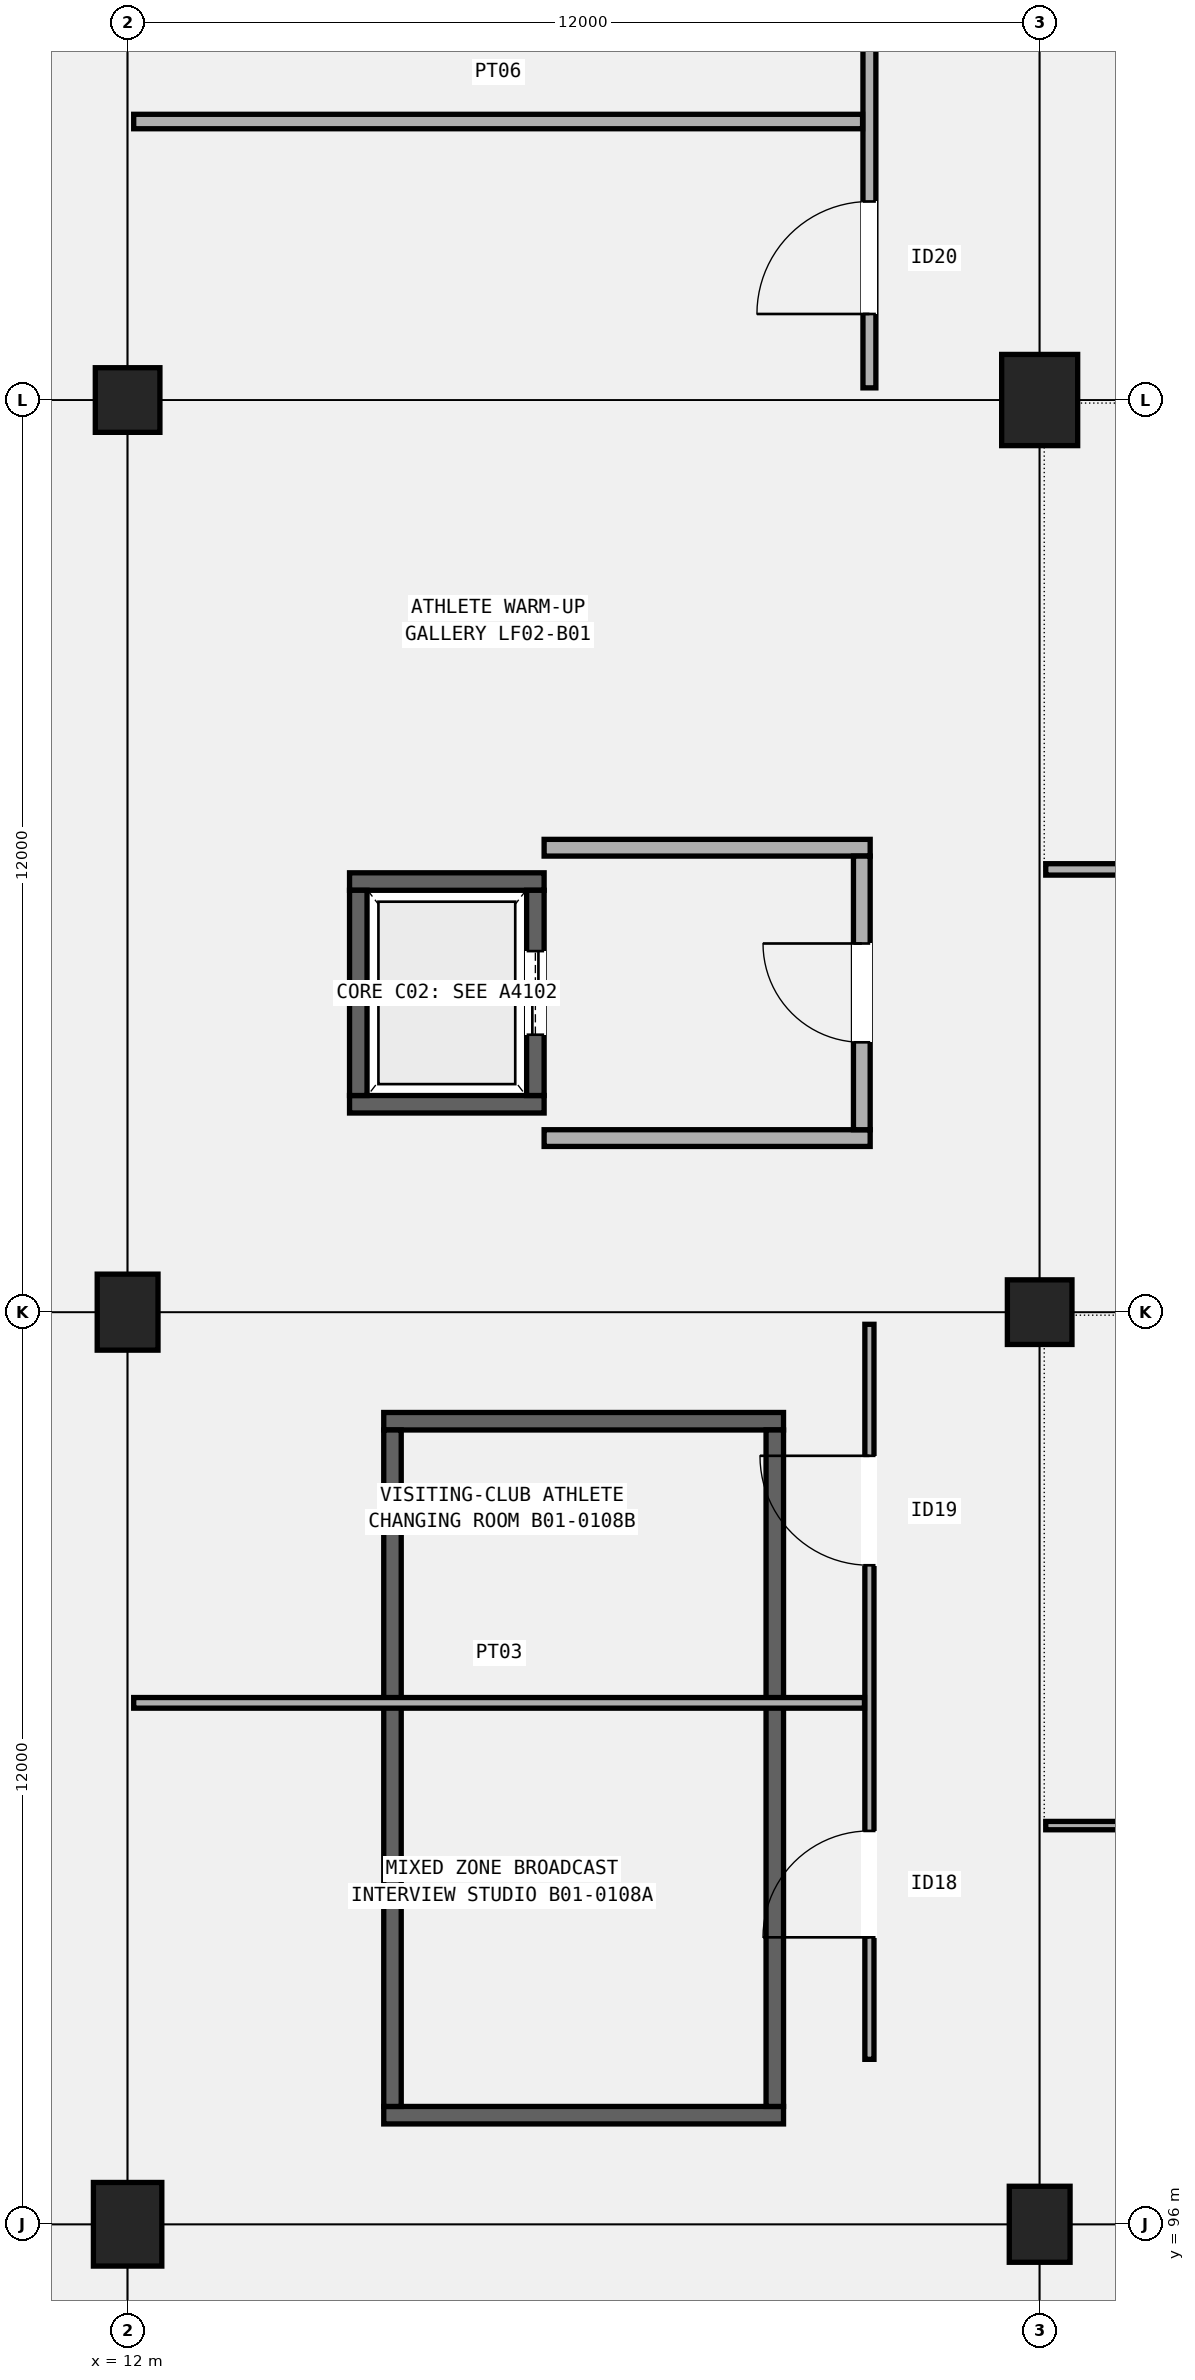
"""IFC4 building model, lengths in metres.
Left out: names, types, materials, properties, quantities, classifications, styles, units other than length and angle.
Written with IfcOpenShell. Run it as: python <this file> out.ifc"""

import sys

from ifc_helpers import new_model, si_unit, direction, frame, frame_2d, origin, origin_2d, place, context, subcontext, project, spatial, rectangle, circle, extrude, element, fill, save


model = new_model("IFC4")
c1 = context("Model", 3, precision=1e-05, world=origin(), true_north=direction((0.0, 1.0)))
c2 = subcontext(c1, "Body", "Model", "MODEL_VIEW")
j1 = project(units=[si_unit("LENGTHUNIT", "METRE"), si_unit("PLANEANGLEUNIT", "RADIAN")], contexts=[c1])
p1 = place(None, origin())
s1 = spatial("IfcSite", under=j1, at=p1, CompositionType="ELEMENT")
p2 = place(p1, origin())
s2 = spatial("IfcBuilding", under=s1, at=p2, CompositionType="ELEMENT")
p3 = place(p2, frame((0.0, 0.0, -4.8)))
s3 = spatial("IfcBuildingStorey", under=s2, at=p3, CompositionType="ELEMENT", Elevation=-4.8)
p4 = place(p3, frame((12.0, 96.0, 0.0), z_axis=(0.0, 0.0, 1.0), x_axis=(1.0, 0.0, 0.0)))
e1 = element("IfcColumn", 1, at=p4, inside=s3, PredefinedType="COLUMN", context=c2, shape_type="SweptSolid", body=[
    extrude(rectangle(XDim=0.9, YDim=1.1, at=origin_2d()), origin(), (0.0, 0.0, 1.0), 4.8),
])
p5 = place(p3, frame((12.0, 108.0, 0.0), z_axis=(0.0, 0.0, 1.0), x_axis=(1.0, 0.0, 0.0)))
e2 = element("IfcColumn", 2, at=p5, inside=s3, PredefinedType="COLUMN", context=c2, shape_type="SweptSolid", body=[
    extrude(rectangle(XDim=0.8, YDim=1.0, at=origin_2d()), origin(), (0.0, 0.0, 1.0), 4.8),
])
p6 = place(p3, frame((12.0, 120.0, 0.0), z_axis=(0.0, 0.0, 1.0), x_axis=(1.0, 0.0, 0.0)))
e3 = element("IfcColumn", 3, at=p6, inside=s3, PredefinedType="COLUMN", context=c2, shape_type="SweptSolid", body=[
    extrude(circle(Radius=0.425, at=origin_2d()), origin(), (0.0, 0.0, 1.0), 4.8),
])
p7 = place(p3, frame((24.0, 96.0, 0.0), z_axis=(0.0, 0.0, 1.0), x_axis=(1.0, 0.0, 0.0)))
e4 = element("IfcColumn", 4, at=p7, inside=s3, PredefinedType="COLUMN", context=c2, shape_type="SweptSolid", body=[
    extrude(rectangle(XDim=0.8, YDim=1.0, at=origin_2d()), origin(), (0.0, 0.0, 1.0), 4.8),
])
p8 = place(p3, frame((24.0, 108.0, 0.0), z_axis=(0.0, 0.0, 1.0), x_axis=(1.0, 0.0, 0.0)))
e5 = element("IfcColumn", 5, at=p8, inside=s3, PredefinedType="COLUMN", context=c2, shape_type="SweptSolid", body=[
    extrude(circle(Radius=0.425, at=origin_2d()), origin(), (0.0, 0.0, 1.0), 4.8),
])
p9 = place(p3, frame((24.0, 120.0, 0.0), z_axis=(0.0, 0.0, 1.0), x_axis=(1.0, 0.0, 0.0)))
e6 = element("IfcColumn", 6, at=p9, inside=s3, PredefinedType="COLUMN", context=c2, shape_type="SweptSolid", body=[
    extrude(rectangle(XDim=1.0, YDim=1.2, at=origin_2d()), origin(), (0.0, 0.0, 1.0), 4.8),
])
for number, where, z_axis, x_axis in (
    (7, (15.37, 97.435, 0.0), (0.0, 0.0, 1.0), (1.0, 0.0, 0.0)),
    (8, (15.37, 106.565, 0.0), (0.0, 0.0, 1.0), (1.0, 0.0, 0.0)),
):
    element("IfcWall", number, at=place(p3, frame(where, z_axis=z_axis, x_axis=x_axis)), inside=s3, PredefinedType="SHEAR", context=c2, shape_type="SweptSolid", body=[
        extrude(rectangle(XDim=5.26, YDim=0.23, at=frame_2d((2.63, 0.0))), origin(), (0.0, 0.0, 1.0), 4.5),
    ])
for number, where, z_axis, x_axis in (
    (9, (15.485, 97.55, 0.0), (0.0, 0.0, 1.0), (0.0, 1.0, 0.0)),
    (10, (20.515, 97.55, 0.0), (0.0, 0.0, 1.0), (0.0, 1.0, 0.0)),
):
    element("IfcWall", number, at=place(p3, frame(where, z_axis=z_axis, x_axis=x_axis)), inside=s3, PredefinedType="SHEAR", context=c2, shape_type="SweptSolid", body=[
        extrude(rectangle(XDim=8.9, YDim=0.23, at=frame_2d((4.45, 0.0))), origin(), (0.0, 0.0, 1.0), 4.5),
    ])
for number, where, z_axis, x_axis in (
    (11, (14.92, 110.735, -0.65), (0.0, 0.0, 1.0), (1.0, 0.0, 0.0)),
    (12, (14.92, 113.665, -0.65), (0.0, 0.0, 1.0), (1.0, 0.0, 0.0)),
):
    element("IfcWall", number, at=place(p3, frame(where, z_axis=z_axis, x_axis=x_axis)), inside=s3, PredefinedType="SHEAR", context=c2, shape_type="SweptSolid", body=[
        extrude(rectangle(XDim=2.56, YDim=0.23, at=frame_2d((1.28, 0.0))), origin(), (0.0, 0.0, 1.0), 4.5),
    ])
p10 = place(p3, frame((15.035, 110.85, -0.65), z_axis=(0.0, 0.0, 1.0), x_axis=(0.0, 1.0, 0.0)))
e13 = element("IfcWall", 13, at=p10, inside=s3, PredefinedType="SHEAR", context=c2, shape_type="SweptSolid", body=[
    extrude(rectangle(XDim=2.7, YDim=0.23, at=frame_2d((1.35, 0.0))), origin(), (0.0, 0.0, 1.0), 4.5),
])
p11 = place(p3, frame((17.365, 110.85, -0.65), z_axis=(0.0, 0.0, 1.0), x_axis=(0.0, 1.0, 0.0)))
e14 = element("IfcWall", 14, at=p11, inside=s3, PredefinedType="SHEAR", context=c2, shape_type="SweptSolid", body=[
    extrude(rectangle(XDim=2.7, YDim=0.23, at=frame_2d((1.35, 0.0))), origin(), (0.0, 0.0, 1.0), 4.5),
])
p12 = place(p11, frame((0.8, 0.0, 0.65)))
e15 = element("IfcOpeningElement", 15, at=p12, cuts=e14, PredefinedType="OPENING", context=c2, shape_type="SweptSolid", body=[
    extrude(rectangle(XDim=1.1, YDim=2.15, at=frame_2d((0.55, 1.075))), frame((0.0, 0.125, 0.0), z_axis=(0.0, -1.0, 0.0), x_axis=(1.0, 0.0, 0.0)), (0.0, 0.0, 1.0), 0.25),
])
for number, where, z_axis, x_axis in (
    (16, (17.48, 110.29, -0.65), (0.0, 0.0, 1.0), (1.0, 0.0, 0.0)),
    (17, (17.48, 114.11, -0.65), (0.0, 0.0, 1.0), (1.0, 0.0, 0.0)),
):
    element("IfcWall", number, at=place(p3, frame(where, z_axis=z_axis, x_axis=x_axis)), inside=s3, PredefinedType="SOLIDWALL", context=c2, shape_type="SweptSolid", body=[
        extrude(rectangle(XDim=4.29, YDim=0.22, at=frame_2d((2.145, 0.0))), origin(), (0.0, 0.0, 1.0), 4.57),
    ])
p13 = place(p3, frame((21.66, 110.4, -0.65), z_axis=(0.0, 0.0, 1.0), x_axis=(0.0, 1.0, 0.0)))
e18 = element("IfcWall", 18, at=p13, inside=s3, PredefinedType="SOLIDWALL", context=c2, shape_type="SweptSolid", body=[
    extrude(rectangle(XDim=3.6, YDim=0.22, at=frame_2d((1.8, 0.0))), origin(), (0.0, 0.0, 1.0), 4.57),
])
p14 = place(p13, frame((1.15, 0.0, 0.65)))
e19 = element("IfcOpeningElement", 19, at=p14, cuts=e18, PredefinedType="OPENING", context=c2, shape_type="SweptSolid", body=[
    extrude(rectangle(XDim=1.3, YDim=2.15, at=frame_2d((0.65, 1.075))), frame((0.0, 0.12, 0.0), z_axis=(0.0, -1.0, 0.0), x_axis=(1.0, 0.0, 0.0)), (0.0, 0.0, 1.0), 0.24),
])
p15 = place(p3, frame((21.76, 98.17, 0.0), z_axis=(0.0, 0.0, 1.0), x_axis=(0.0, 1.0, 0.0)))
e20 = element("IfcWall", 20, at=p15, inside=s3, PredefinedType="PARTITIONING", context=c2, shape_type="SweptSolid", body=[
    extrude(rectangle(XDim=9.67, YDim=0.12, at=frame_2d((4.835, 0.0))), origin(), (0.0, 0.0, 1.0), 3.92),
])
p16 = place(p15, frame((1.605, 0.0, 0.0)))
e21 = element("IfcOpeningElement", 21, at=p16, cuts=e20, PredefinedType="OPENING", context=c2, shape_type="SweptSolid", body=[
    extrude(rectangle(XDim=1.4, YDim=2.24, at=frame_2d((0.7, 1.12))), frame((0.0, 0.07, 0.0), z_axis=(0.0, -1.0, 0.0), x_axis=(1.0, 0.0, 0.0)), (0.0, 0.0, 1.0), 0.14),
])
p17 = place(p15, frame((6.5, 0.0, 0.0)))
e22 = element("IfcOpeningElement", 22, at=p17, cuts=e20, PredefinedType="OPENING", context=c2, shape_type="SweptSolid", body=[
    extrude(rectangle(XDim=1.44, YDim=2.26, at=frame_2d((0.72, 1.13))), frame((0.0, 0.07, 0.0), z_axis=(0.0, -1.0, 0.0), x_axis=(1.0, 0.0, 0.0)), (0.0, 0.0, 1.0), 0.14),
])
p18 = place(p3, frame((12.08, 102.86, 0.0), z_axis=(0.0, 0.0, 1.0), x_axis=(1.0, 0.0, 0.0)))
e23 = element("IfcWall", 23, at=p18, inside=s3, PredefinedType="PARTITIONING", context=c2, shape_type="SweptSolid", body=[
    extrude(rectangle(XDim=9.615, YDim=0.14, at=frame_2d((4.808, 0.0))), origin(), (0.0, 0.0, 1.0), 3.92),
])
p19 = place(p3, frame((21.76, 120.16, 0.0), z_axis=(0.0, 0.0, 1.0), x_axis=(0.0, 1.0, 0.0)))
e24 = element("IfcWall", 24, at=p19, inside=s3, PredefinedType="PARTITIONING", context=c2, shape_type="SweptSolid", body=[
    extrude(rectangle(XDim=11.68, YDim=0.17, at=frame_2d((5.84, 0.0))), origin(), (0.0, 0.0, 1.0), 3.92),
])
p20 = place(p19, frame((0.972, 0.0, 0.0)))
e25 = element("IfcOpeningElement", 25, at=p20, cuts=e24, PredefinedType="OPENING", context=c2, shape_type="SweptSolid", body=[
    extrude(rectangle(XDim=1.48, YDim=2.24, at=frame_2d((0.74, 1.12))), frame((0.0, 0.095, 0.0), z_axis=(0.0, -1.0, 0.0), x_axis=(1.0, 0.0, 0.0)), (0.0, 0.0, 1.0), 0.19),
])
p21 = place(p19, frame((6.872, 0.0, 0.0)))
e26 = element("IfcOpeningElement", 26, at=p21, cuts=e24, PredefinedType="OPENING", context=c2, shape_type="SweptSolid", body=[
    extrude(rectangle(XDim=1.52, YDim=2.28, at=frame_2d((0.76, 1.14))), frame((0.0, 0.095, 0.0), z_axis=(0.0, -1.0, 0.0), x_axis=(1.0, 0.0, 0.0)), (0.0, 0.0, 1.0), 0.19),
])
p22 = place(p3, frame((12.08, 123.664, 0.0), z_axis=(0.0, 0.0, 1.0), x_axis=(1.0, 0.0, 0.0)))
e27 = element("IfcWall", 27, at=p22, inside=s3, PredefinedType="PARTITIONING", context=c2, shape_type="SweptSolid", body=[
    extrude(rectangle(XDim=9.59, YDim=0.19, at=frame_2d((4.795, 0.0))), origin(), (0.0, 0.0, 1.0), 3.92),
])
p23 = place(p3, frame((24.08, 101.245, 0.0), z_axis=(0.0, 0.0, 1.0), x_axis=(1.0, 0.0, 0.0)))
e28 = element("IfcWall", 28, at=p23, inside=s3, PredefinedType="PARTITIONING", context=c2, shape_type="SweptSolid", body=[
    extrude(rectangle(XDim=10.08, YDim=0.11, at=frame_2d((5.04, 0.0))), origin(), (0.0, 0.0, 1.0), 3.92),
])
p24 = place(p3, frame((24.08, 113.825, 0.0), z_axis=(0.0, 0.0, 1.0), x_axis=(1.0, 0.0, 0.0)))
e29 = element("IfcWall", 29, at=p24, inside=s3, PredefinedType="PARTITIONING", context=c2, shape_type="SweptSolid", body=[
    extrude(rectangle(XDim=10.105, YDim=0.15, at=frame_2d((5.052, 0.0))), origin(), (0.0, 0.0, 1.0), 3.92),
])
p25 = place(p12, origin())
e30 = element("IfcDoor", 30, at=p25, inside=s3, OperationType="DOUBLE_DOOR_SLIDING", PredefinedType="DOOR", context=c2, shape_type="SweptSolid", body=[
    extrude(rectangle(XDim=1.1, YDim=2.15, at=frame_2d((0.55, 1.075))), frame((0.0, 0.025, 0.0), z_axis=(0.0, -1.0, 0.0), x_axis=(1.0, 0.0, 0.0)), (0.0, 0.0, 1.0), 0.05),
])
fill(e15, e30)
p26 = place(p14, origin())
e31 = element("IfcDoor", 31, at=p26, inside=s3, OperationType="SINGLE_SWING_RIGHT", PredefinedType="DOOR", context=c2, shape_type="SweptSolid", body=[
    extrude(rectangle(XDim=1.3, YDim=2.15, at=frame_2d((0.65, 1.075))), frame((0.0, 0.025, 0.0), z_axis=(0.0, -1.0, 0.0), x_axis=(1.0, 0.0, 0.0)), (0.0, 0.0, 1.0), 0.05),
])
fill(e19, e31)
p27 = place(p16, origin())
e32 = element("IfcDoor", 32, at=p27, inside=s3, OperationType="SINGLE_SWING_LEFT", PredefinedType="DOOR", context=c2, shape_type="SweptSolid", body=[
    extrude(rectangle(XDim=1.4, YDim=2.24, at=frame_2d((0.7, 1.12))), frame((0.0, 0.025, 0.0), z_axis=(0.0, -1.0, 0.0), x_axis=(1.0, 0.0, 0.0)), (0.0, 0.0, 1.0), 0.05),
])
fill(e21, e32)
p28 = place(p17, origin())
e33 = element("IfcDoor", 33, at=p28, inside=s3, OperationType="SINGLE_SWING_RIGHT", PredefinedType="DOOR", context=c2, shape_type="SweptSolid", body=[
    extrude(rectangle(XDim=1.44, YDim=2.26, at=frame_2d((0.72, 1.13))), frame((0.0, 0.025, 0.0), z_axis=(0.0, -1.0, 0.0), x_axis=(1.0, 0.0, 0.0)), (0.0, 0.0, 1.0), 0.05),
])
fill(e22, e33)
p29 = place(p20, origin())
e34 = element("IfcDoor", 34, at=p29, inside=s3, OperationType="SINGLE_SWING_LEFT", PredefinedType="DOOR", context=c2, shape_type="SweptSolid", body=[
    extrude(rectangle(XDim=1.48, YDim=2.24, at=frame_2d((0.74, 1.12))), frame((0.0, 0.025, 0.0), z_axis=(0.0, -1.0, 0.0), x_axis=(1.0, 0.0, 0.0)), (0.0, 0.0, 1.0), 0.05),
])
fill(e25, e34)
save(model, sys.argv[1])
